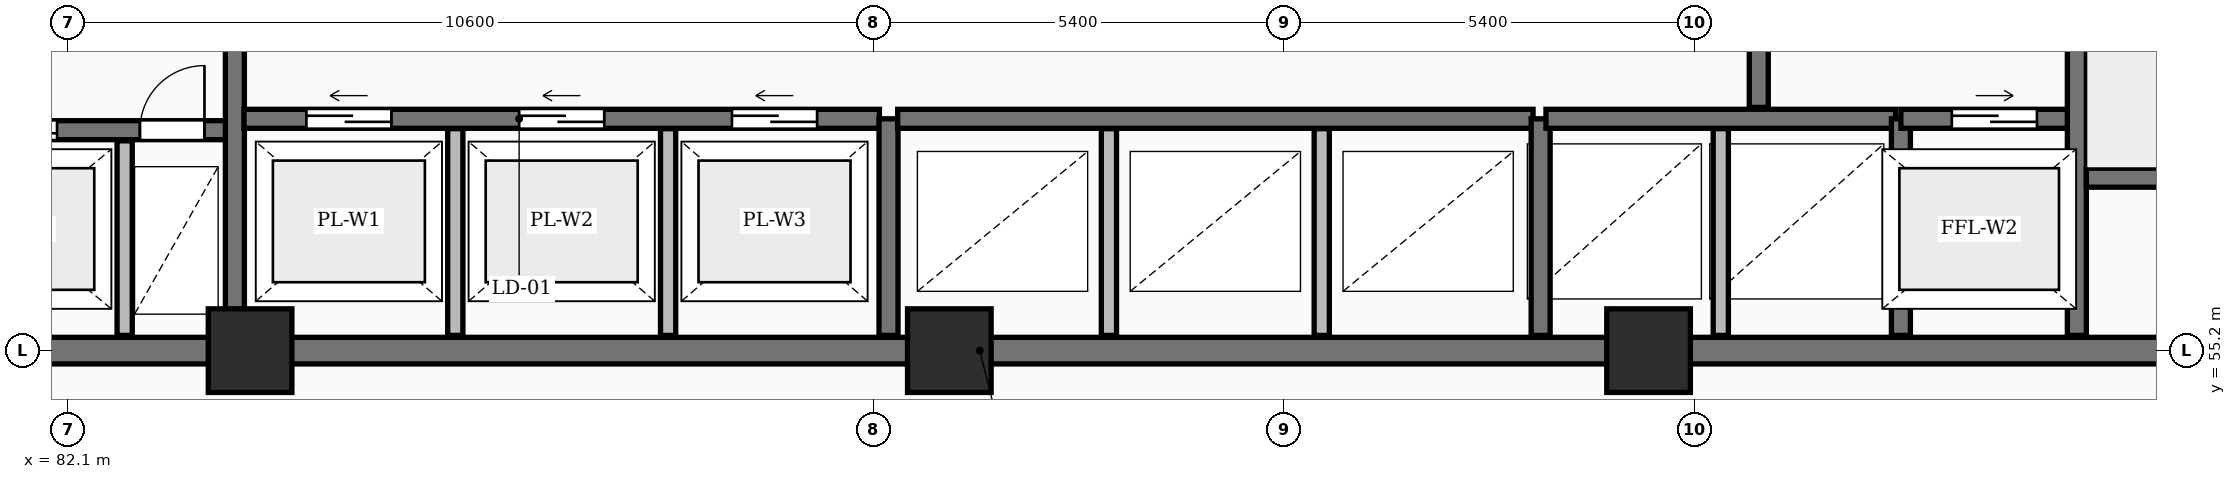
"""IFC4 building model, lengths in metres.
Left out: names, types, materials, properties, quantities, classifications, styles, units other than length and angle.
Written with IfcOpenShell. Run it as: python <this file> out.ifc"""

import sys

from ifc_helpers import new_model, si_unit, direction, frame, frame_2d, origin, origin_2d, place, context, subcontext, project, spatial, rectangle, extrude, element, fill, save


model = new_model("IFC4")
c1 = context("Model", 3, precision=1e-05, world=origin(), true_north=direction((0.0, 1.0)))
c2 = subcontext(c1, "Body", "Model", "MODEL_VIEW")
j1 = project(units=[si_unit("LENGTHUNIT", "METRE"), si_unit("PLANEANGLEUNIT", "RADIAN")], contexts=[c1])
p1 = place(None, origin())
s1 = spatial("IfcSite", under=j1, at=p1, CompositionType="ELEMENT")
p2 = place(p1, origin())
s2 = spatial("IfcBuilding", under=s1, at=p2, CompositionType="ELEMENT")
p3 = place(p2, frame((0.0, 0.0, -7.2)))
s3 = spatial("IfcBuildingStorey", under=s2, at=p3, CompositionType="ELEMENT", Elevation=-7.2)
for number, where, z_axis, x_axis in (
    (1, (84.5, 55.2, 0.0), (0.0, 0.0, 1.0), (1.0, 0.0, 0.0)),
    (2, (93.7, 55.2, 0.0), (0.0, 0.0, 1.0), (1.0, 0.0, 0.0)),
    (3, (102.9, 55.2, 0.0), (0.0, 0.0, 1.0), (1.0, 0.0, 0.0)),
):
    element("IfcColumn", number, at=place(p3, frame(where, z_axis=z_axis, x_axis=x_axis)), inside=s3, PredefinedType="COLUMN", context=c2, shape_type="SweptSolid", body=[
        extrude(rectangle(XDim=1.1, YDim=1.1, at=origin_2d()), origin(), (0.0, 0.0, 1.0), 3.6),
    ])
p4 = place(p3, frame((75.95, 55.2, 0.0), z_axis=(0.0, 0.0, 1.0), x_axis=(1.0, 0.0, 0.0)))
e4 = element("IfcWall", 4, at=p4, inside=s3, PredefinedType="SHEAR", context=c2, shape_type="SweptSolid", body=[
    extrude(rectangle(XDim=36.3, YDim=0.35, at=frame_2d((18.15, 0.0))), origin(), (0.0, 0.0, 1.0), 3.6),
])
p5 = place(p3, frame((79.79, 58.1, 0.0), z_axis=(0.0, 0.0, 1.0), x_axis=(1.0, 0.0, 0.0)))
e5 = element("IfcWall", 5, at=p5, inside=s3, PredefinedType="SHEAR", context=c2, shape_type="SweptSolid", body=[
    extrude(rectangle(XDim=4.39, YDim=0.25, at=frame_2d((2.195, 0.0))), origin(), (0.0, 0.0, 1.0), 3.6),
])
p6 = place(p5, frame((1.05, 0.0, 0.0)))
e6 = element("IfcOpeningElement", 6, at=p6, cuts=e5, PredefinedType="OPENING", context=c2, shape_type="SweptSolid", body=[
    extrude(rectangle(XDim=1.12, YDim=2.12, at=frame_2d((0.56, 1.06))), frame((0.0, 0.135, 0.0), z_axis=(0.0, -1.0, 0.0), x_axis=(1.0, 0.0, 0.0)), (0.0, 0.0, 1.0), 0.27),
])
p7 = place(p5, frame((3.26, 0.0, 0.0)))
e7 = element("IfcOpeningElement", 7, at=p7, cuts=e5, PredefinedType="OPENING", context=c2, shape_type="SweptSolid", body=[
    extrude(rectangle(XDim=0.85, YDim=2.05, at=frame_2d((0.425, 1.025))), frame((0.0, 0.135, 0.0), z_axis=(0.0, -1.0, 0.0), x_axis=(1.0, 0.0, 0.0)), (0.0, 0.0, 1.0), 0.27),
])
p8 = place(p3, frame((82.85, 55.4, 0.0), z_axis=(0.0, 0.0, 1.0), x_axis=(0.0, 1.0, 0.0)))
e8 = element("IfcWall", 8, at=p8, inside=s3, PredefinedType="PARTITIONING", context=c2, shape_type="SweptSolid", body=[
    extrude(rectangle(XDim=2.56, YDim=0.2, at=frame_2d((1.28, 0.0))), origin(), (0.0, 0.0, 1.0), 3.3),
])
p9 = place(p3, frame((84.3, 55.4, 0.0), z_axis=(0.0, 0.0, 1.0), x_axis=(0.0, 1.0, 0.0)))
e9 = element("IfcWall", 9, at=p9, inside=s3, PredefinedType="SHEAR", context=c2, shape_type="SweptSolid", body=[
    extrude(rectangle(XDim=11.6, YDim=0.25, at=frame_2d((5.8, 0.0))), origin(), (0.0, 0.0, 1.0), 3.6),
])
p10 = place(p9, frame((5.2, 0.0, 0.0)))
e10 = element("IfcOpeningElement", 10, at=p10, cuts=e9, PredefinedType="OPENING", context=c2, shape_type="SweptSolid", body=[
    extrude(rectangle(XDim=1.1, YDim=2.1, at=frame_2d((0.55, 1.05))), frame((0.0, 0.135, 0.0), z_axis=(0.0, -1.0, 0.0), x_axis=(1.0, 0.0, 0.0)), (0.0, 0.0, 1.0), 0.27),
])
for number, where, z_axis, x_axis in (
    (11, (87.2, 55.4, 0.0), (0.0, 0.0, 1.0), (0.0, 1.0, 0.0)),
    (12, (90.0, 55.4, 0.0), (0.0, 0.0, 1.0), (0.0, 1.0, 0.0)),
):
    element("IfcWall", number, at=place(p3, frame(where, z_axis=z_axis, x_axis=x_axis)), inside=s3, PredefinedType="PARTITIONING", context=c2, shape_type="SweptSolid", body=[
        extrude(rectangle(XDim=2.72, YDim=0.2, at=frame_2d((1.36, 0.0))), origin(), (0.0, 0.0, 1.0), 3.3),
    ])
p11 = place(p3, frame((84.42, 58.25, 0.0), z_axis=(0.0, 0.0, 1.0), x_axis=(1.0, 0.0, 0.0)))
e13 = element("IfcWall", 13, at=p11, inside=s3, PredefinedType="SHEAR", context=c2, shape_type="SweptSolid", body=[
    extrude(rectangle(XDim=8.36, YDim=0.25, at=frame_2d((4.18, 0.0))), origin(), (0.0, 0.0, 1.0), 3.6),
])
p12 = place(p11, frame((0.82, 0.0, 0.0)))
e14 = element("IfcOpeningElement", 14, at=p12, cuts=e13, PredefinedType="OPENING", context=c2, shape_type="SweptSolid", body=[
    extrude(rectangle(XDim=1.12, YDim=2.12, at=frame_2d((0.56, 1.06))), frame((0.0, 0.135, 0.0), z_axis=(0.0, -1.0, 0.0), x_axis=(1.0, 0.0, 0.0)), (0.0, 0.0, 1.0), 0.27),
])
p13 = place(p11, frame((3.62, 0.0, 0.0)))
e15 = element("IfcOpeningElement", 15, at=p13, cuts=e13, PredefinedType="OPENING", context=c2, shape_type="SweptSolid", body=[
    extrude(rectangle(XDim=1.12, YDim=2.12, at=frame_2d((0.56, 1.06))), frame((0.0, 0.135, 0.0), z_axis=(0.0, -1.0, 0.0), x_axis=(1.0, 0.0, 0.0)), (0.0, 0.0, 1.0), 0.27),
])
p14 = place(p11, frame((6.42, 0.0, 0.0)))
e16 = element("IfcOpeningElement", 16, at=p14, cuts=e13, PredefinedType="OPENING", context=c2, shape_type="SweptSolid", body=[
    extrude(rectangle(XDim=1.12, YDim=2.12, at=frame_2d((0.56, 1.06))), frame((0.0, 0.135, 0.0), z_axis=(0.0, -1.0, 0.0), x_axis=(1.0, 0.0, 0.0)), (0.0, 0.0, 1.0), 0.27),
])
p15 = place(p3, frame((92.9, 55.4, 0.0), z_axis=(0.0, 0.0, 1.0), x_axis=(0.0, 1.0, 0.0)))
e17 = element("IfcWall", 17, at=p15, inside=s3, PredefinedType="SHEAR", context=c2, shape_type="SweptSolid", body=[
    extrude(rectangle(XDim=2.85, YDim=0.25, at=frame_2d((1.425, 0.0))), origin(), (0.0, 0.0, 1.0), 3.6),
])
for number, where, z_axis, x_axis in (
    (18, (95.8, 55.4, 0.0), (0.0, 0.0, 1.0), (0.0, 1.0, 0.0)),
    (19, (98.6, 55.4, 0.0), (0.0, 0.0, 1.0), (0.0, 1.0, 0.0)),
):
    element("IfcWall", number, at=place(p3, frame(where, z_axis=z_axis, x_axis=x_axis)), inside=s3, PredefinedType="PARTITIONING", context=c2, shape_type="SweptSolid", body=[
        extrude(rectangle(XDim=2.72, YDim=0.2, at=frame_2d((1.36, 0.0))), origin(), (0.0, 0.0, 1.0), 3.3),
    ])
p16 = place(p3, frame((93.02, 58.25, 0.0), z_axis=(0.0, 0.0, 1.0), x_axis=(1.0, 0.0, 0.0)))
e20 = element("IfcWall", 20, at=p16, inside=s3, PredefinedType="SHEAR", context=c2, shape_type="SweptSolid", body=[
    extrude(rectangle(XDim=8.36, YDim=0.25, at=frame_2d((4.18, 0.0))), origin(), (0.0, 0.0, 1.0), 3.6),
])
p17 = place(p3, frame((101.48, 55.4, 0.0), z_axis=(0.0, 0.0, 1.0), x_axis=(0.0, 1.0, 0.0)))
e21 = element("IfcWall", 21, at=p17, inside=s3, PredefinedType="SHEAR", context=c2, shape_type="SweptSolid", body=[
    extrude(rectangle(XDim=2.85, YDim=0.25, at=frame_2d((1.425, 0.0))), origin(), (0.0, 0.0, 1.0), 3.6),
])
p18 = place(p3, frame((103.85, 55.4, 0.0), z_axis=(0.0, 0.0, 1.0), x_axis=(0.0, 1.0, 0.0)))
e22 = element("IfcWall", 22, at=p18, inside=s3, PredefinedType="PARTITIONING", context=c2, shape_type="SweptSolid", body=[
    extrude(rectangle(XDim=2.72, YDim=0.2, at=frame_2d((1.36, 0.0))), origin(), (0.0, 0.0, 1.0), 3.3),
])
p19 = place(p3, frame((101.55, 58.25, 0.0), z_axis=(0.0, 0.0, 1.0), x_axis=(1.0, 0.0, 0.0)))
e23 = element("IfcWall", 23, at=p19, inside=s3, PredefinedType="SHEAR", context=c2, shape_type="SweptSolid", body=[
    extrude(rectangle(XDim=4.6, YDim=0.25, at=frame_2d((2.3, 0.0))), origin(), (0.0, 0.0, 1.0), 3.6),
])
p20 = place(p3, frame((106.22, 55.4, 0.0), z_axis=(0.0, 0.0, 1.0), x_axis=(0.0, 1.0, 0.0)))
e24 = element("IfcWall", 24, at=p20, inside=s3, PredefinedType="SHEAR", context=c2, shape_type="SweptSolid", body=[
    extrude(rectangle(XDim=2.85, YDim=0.25, at=frame_2d((1.425, 0.0))), origin(), (0.0, 0.0, 1.0), 3.6),
])
p21 = place(p3, frame((106.22, 58.25, 0.0), z_axis=(0.0, 0.0, 1.0), x_axis=(1.0, 0.0, 0.0)))
e25 = element("IfcWall", 25, at=p21, inside=s3, PredefinedType="SHEAR", context=c2, shape_type="SweptSolid", body=[
    extrude(rectangle(XDim=2.46, YDim=0.25, at=frame_2d((1.23, 0.0))), origin(), (0.0, 0.0, 1.0), 3.6),
])
p22 = place(p21, frame((0.67, 0.0, 0.0)))
e26 = element("IfcOpeningElement", 26, at=p22, cuts=e25, PredefinedType="OPENING", context=c2, shape_type="SweptSolid", body=[
    extrude(rectangle(XDim=1.12, YDim=2.12, at=frame_2d((0.56, 1.06))), frame((0.0, 0.135, 0.0), z_axis=(0.0, -1.0, 0.0), x_axis=(1.0, 0.0, 0.0)), (0.0, 0.0, 1.0), 0.27),
])
p23 = place(p3, frame((104.35, 58.4, 0.0), z_axis=(0.0, 0.0, 1.0), x_axis=(0.0, 1.0, 0.0)))
e27 = element("IfcWall", 27, at=p23, inside=s3, PredefinedType="SHEAR", context=c2, shape_type="SweptSolid", body=[
    extrude(rectangle(XDim=8.6, YDim=0.25, at=frame_2d((4.3, 0.0))), origin(), (0.0, 0.0, 1.0), 3.6),
])
p24 = place(p23, frame((1.8, 0.0, 0.0)))
e28 = element("IfcOpeningElement", 28, at=p24, cuts=e27, PredefinedType="OPENING", context=c2, shape_type="SweptSolid", body=[
    extrude(rectangle(XDim=1.1, YDim=2.1, at=frame_2d((0.55, 1.05))), frame((0.0, 0.135, 0.0), z_axis=(0.0, -1.0, 0.0), x_axis=(1.0, 0.0, 0.0)), (0.0, 0.0, 1.0), 0.27),
])
p25 = place(p3, frame((108.535, 55.4, 0.0), z_axis=(0.0, 0.0, 1.0), x_axis=(0.0, 1.0, 0.0)))
e29 = element("IfcWall", 29, at=p25, inside=s3, PredefinedType="SHEAR", context=c2, shape_type="SweptSolid", body=[
    extrude(rectangle(XDim=11.6, YDim=0.25, at=frame_2d((5.8, 0.0))), origin(), (0.0, 0.0, 1.0), 3.6),
])
p26 = place(p25, frame((8.2, 0.0, 0.0)))
e30 = element("IfcOpeningElement", 30, at=p26, cuts=e29, PredefinedType="OPENING", context=c2, shape_type="SweptSolid", body=[
    extrude(rectangle(XDim=1.1, YDim=2.1, at=frame_2d((0.55, 1.05))), frame((0.0, 0.135, 0.0), z_axis=(0.0, -1.0, 0.0), x_axis=(1.0, 0.0, 0.0)), (0.0, 0.0, 1.0), 0.27),
])
p27 = place(p25, frame((10.25, 0.0, 0.0)))
e31 = element("IfcOpeningElement", 31, at=p27, cuts=e29, PredefinedType="OPENING", context=c2, shape_type="SweptSolid", body=[
    extrude(rectangle(XDim=0.85, YDim=2.05, at=frame_2d((0.425, 1.025))), frame((0.0, 0.135, 0.0), z_axis=(0.0, -1.0, 0.0), x_axis=(1.0, 0.0, 0.0)), (0.0, 0.0, 1.0), 0.27),
])
p28 = place(p3, frame((108.66, 57.475, 0.0), z_axis=(0.0, 0.0, 1.0), x_axis=(1.0, 0.0, 0.0)))
e32 = element("IfcWall", 32, at=p28, inside=s3, PredefinedType="SHEAR", context=c2, shape_type="SweptSolid", body=[
    extrude(rectangle(XDim=3.24, YDim=0.25, at=frame_2d((1.62, 0.0))), origin(), (0.0, 0.0, 1.0), 3.6),
])
p29 = place(p6, origin())
e33 = element("IfcDoor", 33, at=p29, inside=s3, OperationType="SLIDING_TO_LEFT", PredefinedType="DOOR", context=c2, shape_type="SweptSolid", body=[
    extrude(rectangle(XDim=1.12, YDim=2.12, at=frame_2d((0.56, 1.06))), frame((0.0, 0.025, 0.0), z_axis=(0.0, -1.0, 0.0), x_axis=(1.0, 0.0, 0.0)), (0.0, 0.0, 1.0), 0.05),
])
fill(e6, e33)
p30 = place(p7, origin())
e34 = element("IfcDoor", 34, at=p30, inside=s3, OperationType="SINGLE_SWING_RIGHT", PredefinedType="DOOR", context=c2, shape_type="SweptSolid", body=[
    extrude(rectangle(XDim=0.85, YDim=2.05, at=frame_2d((0.425, 1.025))), frame((0.0, 0.025, 0.0), z_axis=(0.0, -1.0, 0.0), x_axis=(1.0, 0.0, 0.0)), (0.0, 0.0, 1.0), 0.05),
])
fill(e7, e34)
p31 = place(p12, origin())
e35 = element("IfcDoor", 35, at=p31, inside=s3, OperationType="SLIDING_TO_LEFT", PredefinedType="DOOR", context=c2, shape_type="SweptSolid", body=[
    extrude(rectangle(XDim=1.12, YDim=2.12, at=frame_2d((0.56, 1.06))), frame((0.0, 0.025, 0.0), z_axis=(0.0, -1.0, 0.0), x_axis=(1.0, 0.0, 0.0)), (0.0, 0.0, 1.0), 0.05),
])
fill(e14, e35)
p32 = place(p13, origin())
e36 = element("IfcDoor", 36, at=p32, inside=s3, OperationType="SLIDING_TO_LEFT", PredefinedType="DOOR", context=c2, shape_type="SweptSolid", body=[
    extrude(rectangle(XDim=1.12, YDim=2.12, at=frame_2d((0.56, 1.06))), frame((0.0, 0.025, 0.0), z_axis=(0.0, -1.0, 0.0), x_axis=(1.0, 0.0, 0.0)), (0.0, 0.0, 1.0), 0.05),
])
fill(e15, e36)
p33 = place(p14, origin())
e37 = element("IfcDoor", 37, at=p33, inside=s3, OperationType="SLIDING_TO_LEFT", PredefinedType="DOOR", context=c2, shape_type="SweptSolid", body=[
    extrude(rectangle(XDim=1.12, YDim=2.12, at=frame_2d((0.56, 1.06))), frame((0.0, 0.025, 0.0), z_axis=(0.0, -1.0, 0.0), x_axis=(1.0, 0.0, 0.0)), (0.0, 0.0, 1.0), 0.05),
])
fill(e16, e37)
p34 = place(p22, origin())
e38 = element("IfcDoor", 38, at=p34, inside=s3, OperationType="SLIDING_TO_RIGHT", PredefinedType="DOOR", context=c2, shape_type="SweptSolid", body=[
    extrude(rectangle(XDim=1.12, YDim=2.12, at=frame_2d((0.56, 1.06))), frame((0.0, 0.025, 0.0), z_axis=(0.0, -1.0, 0.0), x_axis=(1.0, 0.0, 0.0)), (0.0, 0.0, 1.0), 0.05),
])
fill(e26, e38)
save(model, sys.argv[1])
